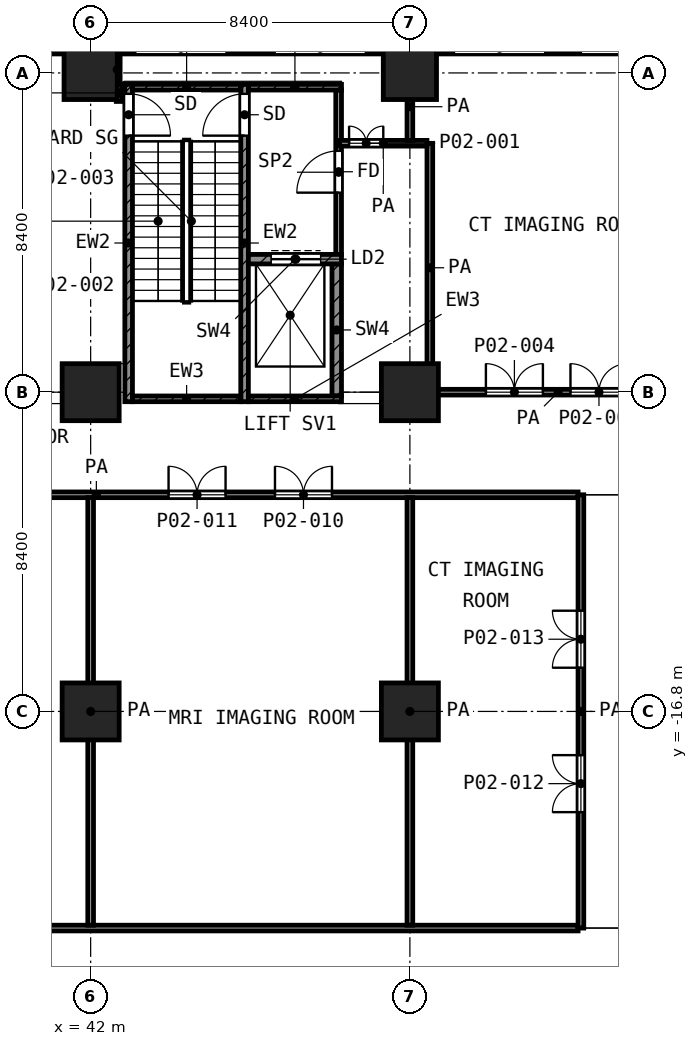
"""IFC4 building model, lengths in metres.
Left out: names, types, materials, properties, quantities, classifications, styles, units other than length and angle.
Written with IfcOpenShell. Run it as: python <this file> out.ifc"""

import sys

from ifc_helpers import new_model, si_unit, direction, frame, frame_2d, origin, origin_2d, place, context, subcontext, project, spatial, rectangle, extrude, element, fill, save


model = new_model("IFC4")
c1 = context("Model", 3, precision=1e-05, world=origin(), true_north=direction((0.0, 1.0)))
c2 = subcontext(c1, "Body", "Model", "MODEL_VIEW")
j1 = project(units=[si_unit("LENGTHUNIT", "METRE"), si_unit("PLANEANGLEUNIT", "RADIAN")], contexts=[c1])
p1 = place(None, origin())
s1 = spatial("IfcSite", under=j1, at=p1, CompositionType="ELEMENT")
p2 = place(p1, origin())
s2 = spatial("IfcBuilding", under=s1, at=p2, CompositionType="ELEMENT")
p3 = place(p2, frame((0.0, 0.0, 7.0)))
s3 = spatial("IfcBuildingStorey", under=s2, at=p3, CompositionType="ELEMENT", Elevation=7.0)
for number, where, z_axis, x_axis in (
    (1, (42.0, 0.0, 0.0), (0.0, 0.0, 1.0), (1.0, 0.0, 0.0)),
    (2, (50.4, 0.0, 0.0), (0.0, 0.0, 1.0), (1.0, 0.0, 0.0)),
):
    element("IfcColumn", number, at=place(p3, frame(where, z_axis=z_axis, x_axis=x_axis)), inside=s3, PredefinedType="COLUMN", context=c2, shape_type="SweptSolid", body=[
        extrude(rectangle(XDim=1.4, YDim=1.4, at=origin_2d()), origin(), (0.0, 0.0, 1.0), 5.6),
    ])
for number, where, z_axis, x_axis in (
    (3, (42.0, -8.4, 0.0), (0.0, 0.0, 1.0), (1.0, 0.0, 0.0)),
    (4, (50.4, -8.4, 0.0), (0.0, 0.0, 1.0), (1.0, 0.0, 0.0)),
    (5, (42.0, -16.8, 0.0), (0.0, 0.0, 1.0), (1.0, 0.0, 0.0)),
    (6, (50.4, -16.8, 0.0), (0.0, 0.0, 1.0), (1.0, 0.0, 0.0)),
):
    element("IfcColumn", number, at=place(p3, frame(where, z_axis=z_axis, x_axis=x_axis)), inside=s3, PredefinedType="COLUMN", context=c2, shape_type="SweptSolid", body=[
        extrude(rectangle(XDim=1.5, YDim=1.5, at=origin_2d()), origin(), (0.0, 0.0, 1.0), 5.6),
    ])
p4 = place(p3, frame((59.85, 0.65, 0.0), z_axis=(0.0, 0.0, 1.0), x_axis=(-1.0, 0.0, 0.0)))
e7 = element("IfcWall", 7, at=p4, inside=s3, PredefinedType="SOLIDWALL", context=c2, shape_type="SweptSolid", body=[
    extrude(rectangle(XDim=54.588, YDim=0.3, at=frame_2d((27.294, 0.0))), origin(), (0.0, 0.0, 1.0), 5.25),
])
p5 = place(p4, frame((1.35, 0.0, 0.9)))
e8 = element("IfcOpeningElement", 8, at=p5, cuts=e7, PredefinedType="OPENING", context=c2, shape_type="SweptSolid", body=[
    extrude(rectangle(XDim=3.6, YDim=3.0, at=frame_2d((1.8, 1.5))), frame((0.0, 0.16, 0.0), z_axis=(0.0, -1.0, 0.0), x_axis=(1.0, 0.0, 0.0)), (0.0, 0.0, 1.0), 0.32),
])
p6 = place(p4, frame((5.89, 0.0, 0.9)))
e9 = element("IfcOpeningElement", 9, at=p6, cuts=e7, PredefinedType="OPENING", context=c2, shape_type="SweptSolid", body=[
    extrude(rectangle(XDim=2.4, YDim=3.0, at=frame_2d((1.2, 1.5))), frame((0.0, 0.16, 0.0), z_axis=(0.0, -1.0, 0.0), x_axis=(1.0, 0.0, 0.0)), (0.0, 0.0, 1.0), 0.32),
])
p7 = place(p4, frame((10.61, 0.0, 0.9)))
e10 = element("IfcOpeningElement", 10, at=p7, cuts=e7, PredefinedType="OPENING", context=c2, shape_type="SweptSolid", body=[
    extrude(rectangle(XDim=2.4, YDim=3.0, at=frame_2d((1.2, 1.5))), frame((0.0, 0.16, 0.0), z_axis=(0.0, -1.0, 0.0), x_axis=(1.0, 0.0, 0.0)), (0.0, 0.0, 1.0), 0.32),
])
p8 = place(p4, frame((14.275, 0.0, 0.9)))
e11 = element("IfcOpeningElement", 11, at=p8, cuts=e7, PredefinedType="OPENING", context=c2, shape_type="SweptSolid", body=[
    extrude(rectangle(XDim=2.4, YDim=3.0, at=frame_2d((1.2, 1.5))), frame((0.0, 0.16, 0.0), z_axis=(0.0, -1.0, 0.0), x_axis=(1.0, 0.0, 0.0)), (0.0, 0.0, 1.0), 0.32),
])
p9 = place(p4, frame((20.271, 0.0, 0.9)))
e12 = element("IfcOpeningElement", 12, at=p9, cuts=e7, PredefinedType="OPENING", context=c2, shape_type="SweptSolid", body=[
    extrude(rectangle(XDim=1.2, YDim=3.0, at=frame_2d((0.6, 1.5))), frame((0.0, 0.16, 0.0), z_axis=(0.0, -1.0, 0.0), x_axis=(1.0, 0.0, 0.0)), (0.0, 0.0, 1.0), 0.32),
])
p10 = place(p4, frame((22.69, 0.0, 0.9)))
e13 = element("IfcOpeningElement", 13, at=p10, cuts=e7, PredefinedType="OPENING", context=c2, shape_type="SweptSolid", body=[
    extrude(rectangle(XDim=2.4, YDim=3.0, at=frame_2d((1.2, 1.5))), frame((0.0, 0.16, 0.0), z_axis=(0.0, -1.0, 0.0), x_axis=(1.0, 0.0, 0.0)), (0.0, 0.0, 1.0), 0.32),
])
p11 = place(p4, frame((27.325, 0.0, 0.9)))
e14 = element("IfcOpeningElement", 14, at=p11, cuts=e7, PredefinedType="OPENING", context=c2, shape_type="SweptSolid", body=[
    extrude(rectangle(XDim=2.4, YDim=3.0, at=frame_2d((1.2, 1.5))), frame((0.0, 0.16, 0.0), z_axis=(0.0, -1.0, 0.0), x_axis=(1.0, 0.0, 0.0)), (0.0, 0.0, 1.0), 0.32),
])
p12 = place(p4, frame((31.09, 0.0, 0.9)))
e15 = element("IfcOpeningElement", 15, at=p12, cuts=e7, PredefinedType="OPENING", context=c2, shape_type="SweptSolid", body=[
    extrude(rectangle(XDim=2.4, YDim=3.0, at=frame_2d((1.2, 1.5))), frame((0.0, 0.16, 0.0), z_axis=(0.0, -1.0, 0.0), x_axis=(1.0, 0.0, 0.0)), (0.0, 0.0, 1.0), 0.32),
])
p13 = place(p4, frame((35.81, 0.0, 0.9)))
e16 = element("IfcOpeningElement", 16, at=p13, cuts=e7, PredefinedType="OPENING", context=c2, shape_type="SweptSolid", body=[
    extrude(rectangle(XDim=2.4, YDim=3.0, at=frame_2d((1.2, 1.5))), frame((0.0, 0.16, 0.0), z_axis=(0.0, -1.0, 0.0), x_axis=(1.0, 0.0, 0.0)), (0.0, 0.0, 1.0), 0.32),
])
p14 = place(p4, frame((39.49, 0.0, 0.9)))
e17 = element("IfcOpeningElement", 17, at=p14, cuts=e7, PredefinedType="OPENING", context=c2, shape_type="SweptSolid", body=[
    extrude(rectangle(XDim=2.4, YDim=3.0, at=frame_2d((1.2, 1.5))), frame((0.0, 0.16, 0.0), z_axis=(0.0, -1.0, 0.0), x_axis=(1.0, 0.0, 0.0)), (0.0, 0.0, 1.0), 0.32),
])
p15 = place(p4, frame((44.21, 0.0, 0.9)))
e18 = element("IfcOpeningElement", 18, at=p15, cuts=e7, PredefinedType="OPENING", context=c2, shape_type="SweptSolid", body=[
    extrude(rectangle(XDim=2.4, YDim=3.0, at=frame_2d((1.2, 1.5))), frame((0.0, 0.16, 0.0), z_axis=(0.0, -1.0, 0.0), x_axis=(1.0, 0.0, 0.0)), (0.0, 0.0, 1.0), 0.32),
])
p16 = place(p4, frame((47.55, 0.0, 0.9)))
e19 = element("IfcOpeningElement", 19, at=p16, cuts=e7, PredefinedType="OPENING", context=c2, shape_type="SweptSolid", body=[
    extrude(rectangle(XDim=3.6, YDim=3.0, at=frame_2d((1.8, 1.5))), frame((0.0, 0.16, 0.0), z_axis=(0.0, -1.0, 0.0), x_axis=(1.0, 0.0, 0.0)), (0.0, 0.0, 1.0), 0.32),
])
p17 = place(p4, frame((51.778, 0.0, 0.9)))
e20 = element("IfcOpeningElement", 20, at=p17, cuts=e7, PredefinedType="OPENING", context=c2, shape_type="SweptSolid", body=[
    extrude(rectangle(XDim=1.2, YDim=3.0, at=frame_2d((0.6, 1.5))), frame((0.0, 0.16, 0.0), z_axis=(0.0, -1.0, 0.0), x_axis=(1.0, 0.0, 0.0)), (0.0, 0.0, 1.0), 0.32),
])
p18 = place(p3, frame((43.0, -8.65, 0.0), z_axis=(0.0, 0.0, 1.0), x_axis=(0.0, 1.0, 0.0)))
e21 = element("IfcWall", 21, at=p18, inside=s3, PredefinedType="SHEAR", context=c2, shape_type="SweptSolid", body=[
    extrude(rectangle(XDim=8.35, YDim=0.2, at=frame_2d((4.175, 0.0))), origin(), (0.0, 0.0, 1.0), 5.25),
])
p19 = place(p18, frame((7.0, 0.0, 0.0)))
e22 = element("IfcOpeningElement", 22, at=p19, cuts=e21, PredefinedType="OPENING", context=c2, shape_type="SweptSolid", body=[
    extrude(rectangle(XDim=1.1, YDim=2.1, at=frame_2d((0.55, 1.05))), frame((0.0, 0.11, 0.0), z_axis=(0.0, -1.0, 0.0), x_axis=(1.0, 0.0, 0.0)), (0.0, 0.0, 1.0), 0.22),
])
p20 = place(p3, frame((46.05, -8.65, 0.0), z_axis=(0.0, 0.0, 1.0), x_axis=(0.0, 1.0, 0.0)))
e23 = element("IfcWall", 23, at=p20, inside=s3, PredefinedType="SHEAR", context=c2, shape_type="SweptSolid", body=[
    extrude(rectangle(XDim=8.35, YDim=0.2, at=frame_2d((4.175, 0.0))), origin(), (0.0, 0.0, 1.0), 5.25),
])
p21 = place(p20, frame((7.0, 0.0, 0.0)))
e24 = element("IfcOpeningElement", 24, at=p21, cuts=e23, PredefinedType="OPENING", context=c2, shape_type="SweptSolid", body=[
    extrude(rectangle(XDim=1.1, YDim=2.1, at=frame_2d((0.55, 1.05))), frame((0.0, 0.11, 0.0), z_axis=(0.0, -1.0, 0.0), x_axis=(1.0, 0.0, 0.0)), (0.0, 0.0, 1.0), 0.22),
])
p22 = place(p3, frame((43.1, -0.375, 0.0), z_axis=(0.0, 0.0, 1.0), x_axis=(1.0, 0.0, 0.0)))
e25 = element("IfcWall", 25, at=p22, inside=s3, PredefinedType="SHEAR", context=c2, shape_type="SweptSolid", body=[
    extrude(rectangle(XDim=2.85, YDim=0.15, at=frame_2d((1.425, 0.0))), origin(), (0.0, 0.0, 1.0), 5.25),
])
p23 = place(p3, frame((46.15, -0.375, 0.0), z_axis=(0.0, 0.0, 1.0), x_axis=(1.0, 0.0, 0.0)))
e26 = element("IfcWall", 26, at=p23, inside=s3, PredefinedType="SHEAR", context=c2, shape_type="SweptSolid", body=[
    extrude(rectangle(XDim=2.45, YDim=0.15, at=frame_2d((1.225, 0.0))), origin(), (0.0, 0.0, 1.0), 5.25),
])
p24 = place(p3, frame((43.1, -8.575, 0.0), z_axis=(0.0, 0.0, 1.0), x_axis=(1.0, 0.0, 0.0)))
e27 = element("IfcWall", 27, at=p24, inside=s3, PredefinedType="SHEAR", context=c2, shape_type="SweptSolid", body=[
    extrude(rectangle(XDim=2.85, YDim=0.15, at=frame_2d((1.425, 0.0))), origin(), (0.0, 0.0, 1.0), 5.25),
])
p25 = place(p3, frame((46.15, -8.575, 0.0), z_axis=(0.0, 0.0, 1.0), x_axis=(1.0, 0.0, 0.0)))
e28 = element("IfcWall", 28, at=p25, inside=s3, PredefinedType="SHEAR", context=c2, shape_type="SweptSolid", body=[
    extrude(rectangle(XDim=2.45, YDim=0.15, at=frame_2d((1.225, 0.0))), origin(), (0.0, 0.0, 1.0), 5.25),
])
p26 = place(p3, frame((46.15, -4.9, 0.0), z_axis=(0.0, 0.0, 1.0), x_axis=(1.0, 0.0, 0.0)))
e29 = element("IfcWall", 29, at=p26, inside=s3, PredefinedType="SHEAR", context=c2, shape_type="SweptSolid", body=[
    extrude(rectangle(XDim=2.45, YDim=0.25, at=frame_2d((1.225, 0.0))), origin(), (0.0, 0.0, 1.0), 5.25),
])
p27 = place(p26, frame((0.6, 0.0, 0.0)))
e30 = element("IfcOpeningElement", 30, at=p27, cuts=e29, PredefinedType="OPENING", context=c2, shape_type="SweptSolid", body=[
    extrude(rectangle(XDim=1.3, YDim=2.1, at=frame_2d((0.65, 1.05))), frame((0.0, 0.135, 0.0), z_axis=(0.0, -1.0, 0.0), x_axis=(1.0, 0.0, 0.0)), (0.0, 0.0, 1.0), 0.27),
])
p28 = place(p3, frame((48.475, -8.5, 0.0), z_axis=(0.0, 0.0, 1.0), x_axis=(0.0, 1.0, 0.0)))
e31 = element("IfcWall", 31, at=p28, inside=s3, PredefinedType="SHEAR", context=c2, shape_type="SweptSolid", body=[
    extrude(rectangle(XDim=3.475, YDim=0.25, at=frame_2d((1.738, 0.0))), origin(), (0.0, 0.0, 1.0), 5.25),
])
p29 = place(p3, frame((48.525, -4.775, 0.0), z_axis=(0.0, 0.0, 1.0), x_axis=(0.0, 1.0, 0.0)))
e32 = element("IfcWall", 32, at=p29, inside=s3, PredefinedType="PARTITIONING", context=c2, shape_type="SweptSolid", body=[
    extrude(rectangle(XDim=4.325, YDim=0.15, at=frame_2d((2.163, 0.0))), origin(), (0.0, 0.0, 1.0), 5.25),
])
p30 = place(p29, frame((1.625, 0.0, 0.0)))
e33 = element("IfcOpeningElement", 33, at=p30, cuts=e32, PredefinedType="OPENING", context=c2, shape_type="SweptSolid", body=[
    extrude(rectangle(XDim=1.1, YDim=2.1, at=frame_2d((0.55, 1.05))), frame((0.0, 0.085, 0.0), z_axis=(0.0, -1.0, 0.0), x_axis=(1.0, 0.0, 0.0)), (0.0, 0.0, 1.0), 0.17),
])
p31 = place(p3, frame((25.2, -22.5, 0.0), z_axis=(0.0, 0.0, 1.0), x_axis=(1.0, 0.0, 0.0)))
e34 = element("IfcWall", 34, at=p31, inside=s3, PredefinedType="PARTITIONING", context=c2, shape_type="SweptSolid", body=[
    extrude(rectangle(XDim=29.625, YDim=0.15, at=frame_2d((14.812, 0.0))), origin(), (0.0, 0.0, 1.0), 5.25),
])
p32 = place(p31, frame((5.65, 0.0, 0.0)))
e35 = element("IfcOpeningElement", 35, at=p32, cuts=e34, PredefinedType="OPENING", context=c2, shape_type="SweptSolid", body=[
    extrude(rectangle(XDim=1.0, YDim=2.1, at=frame_2d((0.5, 1.05))), frame((0.0, 0.085, 0.0), z_axis=(0.0, -1.0, 0.0), x_axis=(1.0, 0.0, 0.0)), (0.0, 0.0, 1.0), 0.17),
])
p33 = place(p31, frame((10.45, 0.0, 0.0)))
e36 = element("IfcOpeningElement", 36, at=p33, cuts=e34, PredefinedType="OPENING", context=c2, shape_type="SweptSolid", body=[
    extrude(rectangle(XDim=1.5, YDim=2.1, at=frame_2d((0.75, 1.05))), frame((0.0, 0.085, 0.0), z_axis=(0.0, -1.0, 0.0), x_axis=(1.0, 0.0, 0.0)), (0.0, 0.0, 1.0), 0.17),
])
p34 = place(p31, frame((13.25, 0.0, 0.0)))
e37 = element("IfcOpeningElement", 37, at=p34, cuts=e34, PredefinedType="OPENING", context=c2, shape_type="SweptSolid", body=[
    extrude(rectangle(XDim=1.5, YDim=2.1, at=frame_2d((0.75, 1.05))), frame((0.0, 0.085, 0.0), z_axis=(0.0, -1.0, 0.0), x_axis=(1.0, 0.0, 0.0)), (0.0, 0.0, 1.0), 0.17),
])
p35 = place(p3, frame((29.475, -11.1, 0.0), z_axis=(0.0, 0.0, 1.0), x_axis=(1.0, 0.0, 0.0)))
e38 = element("IfcWall", 38, at=p35, inside=s3, PredefinedType="PARTITIONING", context=c2, shape_type="SweptSolid", body=[
    extrude(rectangle(XDim=25.35, YDim=0.15, at=frame_2d((12.675, 0.0))), origin(), (0.0, 0.0, 1.0), 5.25),
])
p36 = place(p35, frame((17.375, 0.0, 0.0)))
e39 = element("IfcOpeningElement", 39, at=p36, cuts=e38, PredefinedType="OPENING", context=c2, shape_type="SweptSolid", body=[
    extrude(rectangle(XDim=1.5, YDim=2.1, at=frame_2d((0.75, 1.05))), frame((0.0, 0.085, 0.0), z_axis=(0.0, -1.0, 0.0), x_axis=(1.0, 0.0, 0.0)), (0.0, 0.0, 1.0), 0.17),
])
p37 = place(p35, frame((14.575, 0.0, 0.0)))
e40 = element("IfcOpeningElement", 40, at=p37, cuts=e38, PredefinedType="OPENING", context=c2, shape_type="SweptSolid", body=[
    extrude(rectangle(XDim=1.5, YDim=2.1, at=frame_2d((0.75, 1.05))), frame((0.0, 0.085, 0.0), z_axis=(0.0, -1.0, 0.0), x_axis=(1.0, 0.0, 0.0)), (0.0, 0.0, 1.0), 0.17),
])
p38 = place(p3, frame((51.0, -8.4, 0.0), z_axis=(0.0, 0.0, 1.0), x_axis=(1.0, 0.0, 0.0)))
e41 = element("IfcWall", 41, at=p38, inside=s3, PredefinedType="PARTITIONING", context=c2, shape_type="SweptSolid", body=[
    extrude(rectangle(XDim=6.6, YDim=0.15, at=frame_2d((3.3, 0.0))), origin(), (0.0, 0.0, 1.0), 5.25),
])
p39 = place(p38, frame((1.4, 0.0, 0.0)))
e42 = element("IfcOpeningElement", 42, at=p39, cuts=e41, PredefinedType="OPENING", context=c2, shape_type="SweptSolid", body=[
    extrude(rectangle(XDim=1.5, YDim=2.1, at=frame_2d((0.75, 1.05))), frame((0.0, 0.085, 0.0), z_axis=(0.0, -1.0, 0.0), x_axis=(1.0, 0.0, 0.0)), (0.0, 0.0, 1.0), 0.17),
])
p40 = place(p38, frame((3.625, 0.0, 0.0)))
e43 = element("IfcOpeningElement", 43, at=p40, cuts=e41, PredefinedType="OPENING", context=c2, shape_type="SweptSolid", body=[
    extrude(rectangle(XDim=1.5, YDim=2.1, at=frame_2d((0.75, 1.05))), frame((0.0, 0.085, 0.0), z_axis=(0.0, -1.0, 0.0), x_axis=(1.0, 0.0, 0.0)), (0.0, 0.0, 1.0), 0.17),
])
p41 = place(p3, frame((48.55, -1.85, 0.0), z_axis=(0.0, 0.0, 1.0), x_axis=(1.0, 0.0, 0.0)))
e44 = element("IfcWall", 44, at=p41, inside=s3, PredefinedType="PARTITIONING", context=c2, shape_type="SweptSolid", body=[
    extrude(rectangle(XDim=2.298, YDim=0.15, at=frame_2d((1.149, 0.0))), origin(), (0.0, 0.0, 1.0), 5.25),
])
p42 = place(p41, frame((0.25, 0.0, 0.0)))
e45 = element("IfcOpeningElement", 45, at=p42, cuts=e44, PredefinedType="OPENING", context=c2, shape_type="SweptSolid", body=[
    extrude(rectangle(XDim=0.9, YDim=2.1, at=frame_2d((0.45, 1.05))), frame((0.0, 0.085, 0.0), z_axis=(0.0, -1.0, 0.0), x_axis=(1.0, 0.0, 0.0)), (0.0, 0.0, 1.0), 0.17),
])
p43 = place(p3, frame((42.0, -22.425, 0.0), z_axis=(0.0, 0.0, 1.0), x_axis=(0.0, 1.0, 0.0)))
e46 = element("IfcWall", 46, at=p43, inside=s3, PredefinedType="PARTITIONING", context=c2, shape_type="SweptSolid", body=[
    extrude(rectangle(XDim=11.25, YDim=0.15, at=frame_2d((5.625, 0.0))), origin(), (0.0, 0.0, 1.0), 5.25),
])
p44 = place(p3, frame((42.7, -0.3, 0.0), z_axis=(0.0, 0.0, 1.0), x_axis=(0.0, 1.0, 0.0)))
e47 = element("IfcWall", 47, at=p44, inside=s3, PredefinedType="PARTITIONING", context=c2, shape_type="SweptSolid", body=[
    extrude(rectangle(XDim=0.78, YDim=0.15, at=frame_2d((0.39, 0.0))), origin(), (0.0, 0.0, 1.0), 3.85),
])
p45 = place(p3, frame((42.75, -0.75, 0.0), z_axis=(0.0, 0.0, 1.0), x_axis=(0.0, 1.0, 0.0)))
e48 = element("IfcWall", 48, at=p45, inside=s3, PredefinedType="PARTITIONING", context=c2, shape_type="SweptSolid", body=[
    extrude(rectangle(XDim=0.45, YDim=0.15, at=frame_2d((0.225, 0.0))), origin(), (0.0, 0.0, 1.0), 3.85),
])
p46 = place(p3, frame((50.4, -22.425, 0.0), z_axis=(0.0, 0.0, 1.0), x_axis=(0.0, 1.0, 0.0)))
e49 = element("IfcWall", 49, at=p46, inside=s3, PredefinedType="PARTITIONING", context=c2, shape_type="SweptSolid", body=[
    extrude(rectangle(XDim=11.25, YDim=0.15, at=frame_2d((5.625, 0.0))), origin(), (0.0, 0.0, 1.0), 5.25),
])
p47 = place(p3, frame((50.4, -1.775, 0.0), z_axis=(0.0, 0.0, 1.0), x_axis=(0.0, 1.0, 0.0)))
e50 = element("IfcWall", 50, at=p47, inside=s3, PredefinedType="PARTITIONING", context=c2, shape_type="SweptSolid", body=[
    extrude(rectangle(XDim=1.772, YDim=0.15, at=frame_2d((0.886, 0.0))), origin(), (0.0, 0.0, 1.0), 5.25),
])
p48 = place(p3, frame((50.925, -8.4, 0.0), z_axis=(0.0, 0.0, 1.0), x_axis=(0.0, 1.0, 0.0)))
e51 = element("IfcWall", 51, at=p48, inside=s3, PredefinedType="PARTITIONING", context=c2, shape_type="SweptSolid", body=[
    extrude(rectangle(XDim=6.548, YDim=0.15, at=frame_2d((3.274, 0.0))), origin(), (0.0, 0.0, 1.0), 5.25),
])
p49 = place(p3, frame((54.9, -22.5, 0.0), z_axis=(0.0, 0.0, 1.0), x_axis=(0.0, 1.0, 0.0)))
e52 = element("IfcWall", 52, at=p49, inside=s3, PredefinedType="PARTITIONING", context=c2, shape_type="SweptSolid", body=[
    extrude(rectangle(XDim=11.4, YDim=0.15, at=frame_2d((5.7, 0.0))), origin(), (0.0, 0.0, 1.0), 5.25),
])
p50 = place(p49, frame((3.05, 0.0, 0.0)))
e53 = element("IfcOpeningElement", 53, at=p50, cuts=e52, PredefinedType="OPENING", context=c2, shape_type="SweptSolid", body=[
    extrude(rectangle(XDim=1.5, YDim=2.1, at=frame_2d((0.75, 1.05))), frame((0.0, 0.085, 0.0), z_axis=(0.0, -1.0, 0.0), x_axis=(1.0, 0.0, 0.0)), (0.0, 0.0, 1.0), 0.17),
])
p51 = place(p49, frame((6.85, 0.0, 0.0)))
e54 = element("IfcOpeningElement", 54, at=p51, cuts=e52, PredefinedType="OPENING", context=c2, shape_type="SweptSolid", body=[
    extrude(rectangle(XDim=1.5, YDim=2.1, at=frame_2d((0.75, 1.05))), frame((0.0, 0.085, 0.0), z_axis=(0.0, -1.0, 0.0), x_axis=(1.0, 0.0, 0.0)), (0.0, 0.0, 1.0), 0.17),
])
p52 = place(p19, frame((1.1, 0.0, 0.0), z_axis=(0.0, 0.0, 1.0), x_axis=(-1.0, 0.0, 0.0)))
e55 = element("IfcDoor", 55, at=p52, inside=s3, OperationType="SINGLE_SWING_LEFT", PredefinedType="DOOR", context=c2, shape_type="SweptSolid", body=[
    extrude(rectangle(XDim=1.1, YDim=2.1, at=frame_2d((0.55, 1.05))), frame((0.0, 0.025, 0.0), z_axis=(0.0, -1.0, 0.0), x_axis=(1.0, 0.0, 0.0)), (0.0, 0.0, 1.0), 0.05),
])
fill(e22, e55)
p53 = place(p21, origin())
e56 = element("IfcDoor", 56, at=p53, inside=s3, OperationType="SINGLE_SWING_LEFT", PredefinedType="DOOR", context=c2, shape_type="SweptSolid", body=[
    extrude(rectangle(XDim=1.1, YDim=2.1, at=frame_2d((0.55, 1.05))), frame((0.0, 0.025, 0.0), z_axis=(0.0, -1.0, 0.0), x_axis=(1.0, 0.0, 0.0)), (0.0, 0.0, 1.0), 0.05),
])
fill(e24, e56)
p54 = place(p27, origin())
e57 = element("IfcDoor", 57, at=p54, inside=s3, OperationType="DOUBLE_DOOR_SLIDING", PredefinedType="DOOR", context=c2, shape_type="SweptSolid", body=[
    extrude(rectangle(XDim=1.3, YDim=2.1, at=frame_2d((0.65, 1.05))), frame((0.0, 0.025, 0.0), z_axis=(0.0, -1.0, 0.0), x_axis=(1.0, 0.0, 0.0)), (0.0, 0.0, 1.0), 0.05),
])
fill(e30, e57)
p55 = place(p30, origin())
e58 = element("IfcDoor", 58, at=p55, inside=s3, OperationType="SINGLE_SWING_LEFT", PredefinedType="DOOR", context=c2, shape_type="SweptSolid", body=[
    extrude(rectangle(XDim=1.1, YDim=2.1, at=frame_2d((0.55, 1.05))), frame((0.0, 0.025, 0.0), z_axis=(0.0, -1.0, 0.0), x_axis=(1.0, 0.0, 0.0)), (0.0, 0.0, 1.0), 0.05),
])
fill(e33, e58)
p56 = place(p42, origin())
e59 = element("IfcDoor", 59, at=p56, inside=s3, OperationType="DOUBLE_DOOR_SINGLE_SWING", PredefinedType="DOOR", context=c2, shape_type="SweptSolid", body=[
    extrude(rectangle(XDim=0.9, YDim=2.1, at=frame_2d((0.45, 1.05))), frame((0.0, 0.025, 0.0), z_axis=(0.0, -1.0, 0.0), x_axis=(1.0, 0.0, 0.0)), (0.0, 0.0, 1.0), 0.05),
])
fill(e45, e59)
p57 = place(p39, origin())
e60 = element("IfcDoor", 60, at=p57, inside=s3, OperationType="DOUBLE_DOOR_SINGLE_SWING", PredefinedType="DOOR", context=c2, shape_type="SweptSolid", body=[
    extrude(rectangle(XDim=1.5, YDim=2.1, at=frame_2d((0.75, 1.05))), frame((0.0, 0.025, 0.0), z_axis=(0.0, -1.0, 0.0), x_axis=(1.0, 0.0, 0.0)), (0.0, 0.0, 1.0), 0.05),
])
fill(e42, e60)
p58 = place(p40, origin())
e61 = element("IfcDoor", 61, at=p58, inside=s3, OperationType="DOUBLE_DOOR_SINGLE_SWING", PredefinedType="DOOR", context=c2, shape_type="SweptSolid", body=[
    extrude(rectangle(XDim=1.5, YDim=2.1, at=frame_2d((0.75, 1.05))), frame((0.0, 0.025, 0.0), z_axis=(0.0, -1.0, 0.0), x_axis=(1.0, 0.0, 0.0)), (0.0, 0.0, 1.0), 0.05),
])
fill(e43, e61)
p59 = place(p36, origin())
e62 = element("IfcDoor", 62, at=p59, inside=s3, OperationType="DOUBLE_DOOR_SINGLE_SWING", PredefinedType="DOOR", context=c2, shape_type="SweptSolid", body=[
    extrude(rectangle(XDim=1.5, YDim=2.1, at=frame_2d((0.75, 1.05))), frame((0.0, 0.025, 0.0), z_axis=(0.0, -1.0, 0.0), x_axis=(1.0, 0.0, 0.0)), (0.0, 0.0, 1.0), 0.05),
])
fill(e39, e62)
p60 = place(p37, origin())
e63 = element("IfcDoor", 63, at=p60, inside=s3, OperationType="DOUBLE_DOOR_SINGLE_SWING", PredefinedType="DOOR", context=c2, shape_type="SweptSolid", body=[
    extrude(rectangle(XDim=1.5, YDim=2.1, at=frame_2d((0.75, 1.05))), frame((0.0, 0.025, 0.0), z_axis=(0.0, -1.0, 0.0), x_axis=(1.0, 0.0, 0.0)), (0.0, 0.0, 1.0), 0.05),
])
fill(e40, e63)
p61 = place(p50, origin())
e64 = element("IfcDoor", 64, at=p61, inside=s3, OperationType="DOUBLE_DOOR_SINGLE_SWING", PredefinedType="DOOR", context=c2, shape_type="SweptSolid", body=[
    extrude(rectangle(XDim=1.5, YDim=2.1, at=frame_2d((0.75, 1.05))), frame((0.0, 0.025, 0.0), z_axis=(0.0, -1.0, 0.0), x_axis=(1.0, 0.0, 0.0)), (0.0, 0.0, 1.0), 0.05),
])
fill(e53, e64)
p62 = place(p51, origin())
e65 = element("IfcDoor", 65, at=p62, inside=s3, OperationType="DOUBLE_DOOR_SINGLE_SWING", PredefinedType="DOOR", context=c2, shape_type="SweptSolid", body=[
    extrude(rectangle(XDim=1.5, YDim=2.1, at=frame_2d((0.75, 1.05))), frame((0.0, 0.025, 0.0), z_axis=(0.0, -1.0, 0.0), x_axis=(1.0, 0.0, 0.0)), (0.0, 0.0, 1.0), 0.05),
])
fill(e54, e65)
save(model, sys.argv[1])
